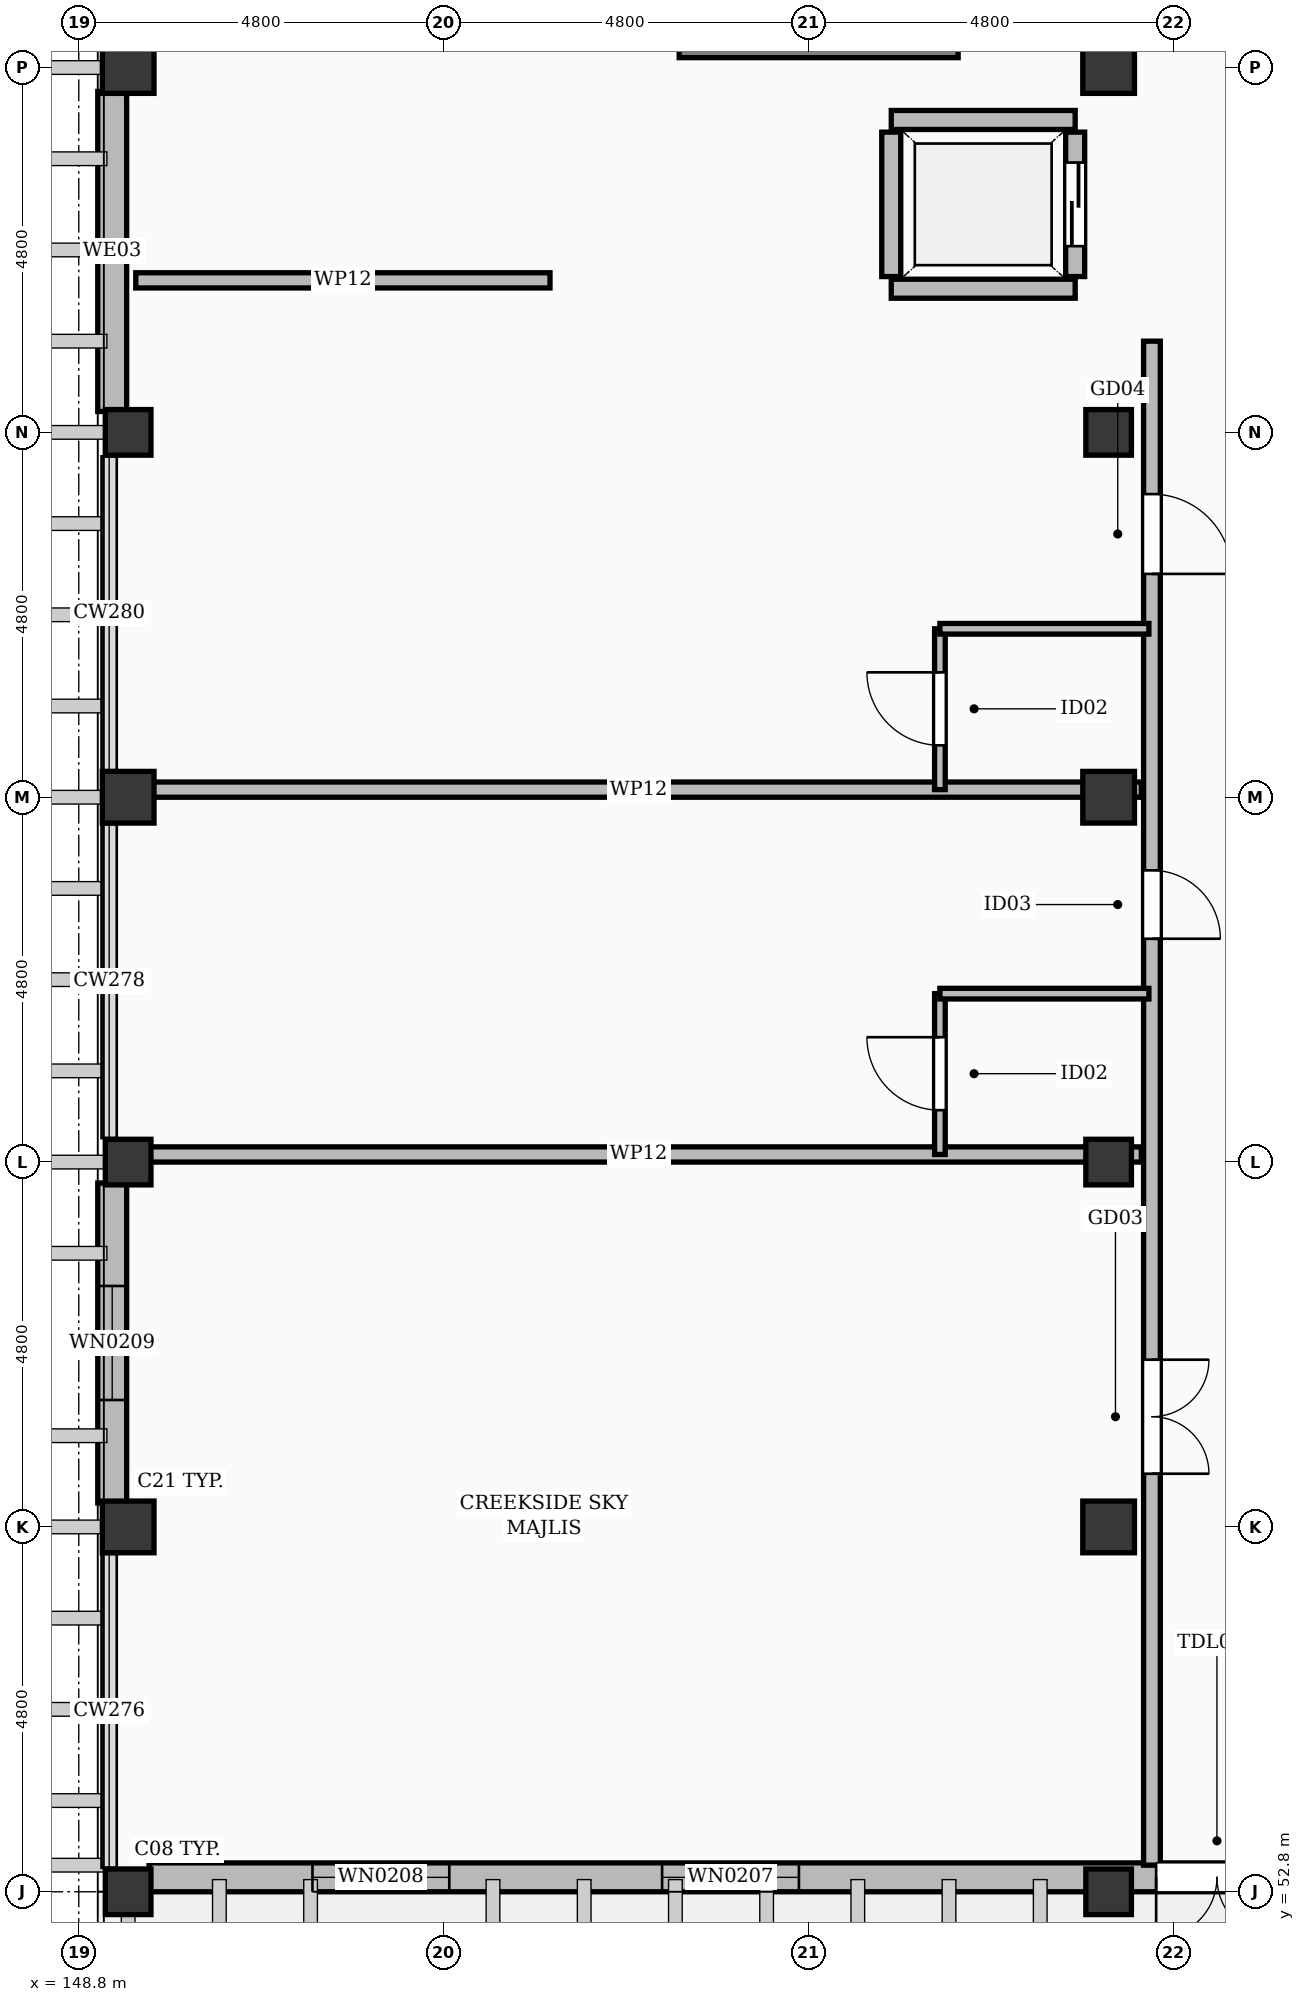
"""IFC4 building model, lengths in metres.
Left out: names, types, materials, properties, quantities, classifications, styles, units other than length and angle.
Written with IfcOpenShell. Run it as: python <this file> out.ifc"""

import sys

from ifc_helpers import new_model, si_unit, direction, frame, frame_2d, origin, origin_2d, place, context, subcontext, project, spatial, rectangle, extrude, element, fill, save


model = new_model("IFC4")
c1 = context("Model", 3, precision=1e-05, world=origin(), true_north=direction((0.0, 1.0)))
c2 = subcontext(c1, "Body", "Model", "MODEL_VIEW")
j1 = project(units=[si_unit("LENGTHUNIT", "METRE"), si_unit("PLANEANGLEUNIT", "RADIAN")], contexts=[c1])
p1 = place(None, origin())
s1 = spatial("IfcSite", under=j1, at=p1, CompositionType="ELEMENT")
p2 = place(p1, origin())
s2 = spatial("IfcBuilding", under=s1, at=p2, CompositionType="ELEMENT")
p3 = place(p2, frame((0.0, 0.0, 35.4)))
s3 = spatial("IfcBuildingStorey", under=s2, at=p3, CompositionType="ELEMENT", Elevation=35.4)
for number, where, z_axis, x_axis in (
    (1, (149.45, 57.6, 0.0), (0.0, 0.0, 1.0), (1.0, 0.0, 0.0)),
    (2, (149.45, 67.2, 0.0), (0.0, 0.0, 1.0), (1.0, 0.0, 0.0)),
    (3, (149.45, 76.8, 0.0), (0.0, 0.0, 1.0), (1.0, 0.0, 0.0)),
    (4, (162.35, 57.6, 0.0), (0.0, 0.0, 1.0), (1.0, 0.0, 0.0)),
    (5, (162.35, 67.2, 0.0), (0.0, 0.0, 1.0), (1.0, 0.0, 0.0)),
    (6, (162.35, 76.8, 0.0), (0.0, 0.0, 1.0), (1.0, 0.0, 0.0)),
):
    element("IfcColumn", number, at=place(p3, frame(where, z_axis=z_axis, x_axis=x_axis)), inside=s3, PredefinedType="COLUMN", context=c2, shape_type="SweptSolid", body=[
        extrude(rectangle(XDim=0.68, YDim=0.68, at=origin_2d()), origin(), (0.0, 0.0, 1.0), 3.6),
    ])
for number, where, z_axis, x_axis in (
    (7, (149.45, 52.8, 0.0), (0.0, 0.0, 1.0), (1.0, 0.0, 0.0)),
    (8, (149.45, 62.4, 0.0), (0.0, 0.0, 1.0), (1.0, 0.0, 0.0)),
    (9, (149.45, 72.0, 0.0), (0.0, 0.0, 1.0), (1.0, 0.0, 0.0)),
    (10, (162.35, 52.8, 0.0), (0.0, 0.0, 1.0), (1.0, 0.0, 0.0)),
    (11, (162.35, 62.4, 0.0), (0.0, 0.0, 1.0), (1.0, 0.0, 0.0)),
    (12, (162.35, 72.0, 0.0), (0.0, 0.0, 1.0), (1.0, 0.0, 0.0)),
):
    element("IfcColumn", number, at=place(p3, frame(where, z_axis=z_axis, x_axis=x_axis)), inside=s3, PredefinedType="COLUMN", context=c2, shape_type="SweptSolid", body=[
        extrude(rectangle(XDim=0.6, YDim=0.6, at=origin_2d()), origin(), (0.0, 0.0, 1.0), 3.6),
    ])
p4 = place(p3, frame((179.075, 52.99, 0.0), z_axis=(0.0, 0.0, 1.0), x_axis=(-1.0, 0.0, 0.0)))
e13 = element("IfcWall", 13, at=p4, inside=s3, PredefinedType="SOLIDWALL", context=c2, shape_type="SweptSolid", body=[
    extrude(rectangle(XDim=29.35, YDim=0.38, at=frame_2d((14.675, 0.0))), origin(), (0.0, 0.0, 1.0), 2.602),
])
p5 = place(p4, frame((14.5, 0.0, 0.0)))
e14 = element("IfcOpeningElement", 14, at=p5, cuts=e13, PredefinedType="OPENING", context=c2, shape_type="SweptSolid", body=[
    extrude(rectangle(XDim=1.6, YDim=2.25, at=frame_2d((0.8, 1.125))), frame((0.0, 0.202, 0.0), z_axis=(0.0, -1.0, 0.0), x_axis=(1.0, 0.0, 0.0)), (0.0, 0.0, 1.0), 0.404),
])
p6 = place(p4, frame((4.0, 0.0, 0.55)))
e15 = element("IfcOpeningElement", 15, at=p6, cuts=e13, PredefinedType="OPENING", context=c2, shape_type="SweptSolid", body=[
    extrude(rectangle(XDim=1.8, YDim=1.76, at=frame_2d((0.9, 0.88))), frame((0.0, 0.202, 0.0), z_axis=(0.0, -1.0, 0.0), x_axis=(1.0, 0.0, 0.0)), (0.0, 0.0, 1.0), 0.404),
])
p7 = place(p4, frame((9.6, 0.0, 0.55)))
e16 = element("IfcOpeningElement", 16, at=p7, cuts=e13, PredefinedType="OPENING", context=c2, shape_type="SweptSolid", body=[
    extrude(rectangle(XDim=1.8, YDim=1.76, at=frame_2d((0.9, 0.88))), frame((0.0, 0.202, 0.0), z_axis=(0.0, -1.0, 0.0), x_axis=(1.0, 0.0, 0.0)), (0.0, 0.0, 1.0), 0.404),
])
p8 = place(p4, frame((20.8, 0.0, 0.55)))
e17 = element("IfcOpeningElement", 17, at=p8, cuts=e13, PredefinedType="OPENING", context=c2, shape_type="SweptSolid", body=[
    extrude(rectangle(XDim=1.8, YDim=1.76, at=frame_2d((0.9, 0.88))), frame((0.0, 0.202, 0.0), z_axis=(0.0, -1.0, 0.0), x_axis=(1.0, 0.0, 0.0)), (0.0, 0.0, 1.0), 0.404),
])
p9 = place(p4, frame((25.4, 0.0, 0.55)))
e18 = element("IfcOpeningElement", 18, at=p9, cuts=e13, PredefinedType="OPENING", context=c2, shape_type="SweptSolid", body=[
    extrude(rectangle(XDim=1.8, YDim=1.76, at=frame_2d((0.9, 0.88))), frame((0.0, 0.202, 0.0), z_axis=(0.0, -1.0, 0.0), x_axis=(1.0, 0.0, 0.0)), (0.0, 0.0, 1.0), 0.404),
])
p10 = place(p3, frame((149.24, 57.915, 0.0), z_axis=(0.0, 0.0, 1.0), x_axis=(0.0, 1.0, 0.0)))
e19 = element("IfcWall", 19, at=p10, inside=s3, PredefinedType="SOLIDWALL", context=c2, shape_type="SweptSolid", body=[
    extrude(rectangle(XDim=4.21, YDim=0.38, at=frame_2d((2.105, 0.0))), origin(), (0.0, 0.0, 1.0), 2.732),
])
p11 = place(p10, frame((1.355, 0.0, 0.55)))
e20 = element("IfcOpeningElement", 20, at=p11, cuts=e19, PredefinedType="OPENING", context=c2, shape_type="SweptSolid", body=[
    extrude(rectangle(XDim=1.5, YDim=1.74, at=frame_2d((0.75, 0.87))), frame((0.0, 0.202, 0.0), z_axis=(0.0, -1.0, 0.0), x_axis=(1.0, 0.0, 0.0)), (0.0, 0.0, 1.0), 0.404),
])
p12 = place(p3, frame((149.24, 72.275, 0.0), z_axis=(0.0, 0.0, 1.0), x_axis=(0.0, 1.0, 0.0)))
e21 = element("IfcWall", 21, at=p12, inside=s3, PredefinedType="SOLIDWALL", context=c2, shape_type="SweptSolid", body=[
    extrude(rectangle(XDim=4.21, YDim=0.38, at=frame_2d((2.105, 0.0))), origin(), (0.0, 0.0, 1.0), 2.732),
])
p13 = place(p3, frame((156.7, 77.18, 0.0), z_axis=(0.0, 0.0, 1.0), x_axis=(1.0, 0.0, 0.0)))
e22 = element("IfcWall", 22, at=p13, inside=s3, PredefinedType="SHEAR", context=c2, shape_type="SweptSolid", body=[
    extrude(rectangle(XDim=3.67, YDim=0.5, at=frame_2d((1.835, 0.0))), origin(), (0.0, 0.0, 1.0), 3.36),
])
for number, where, z_axis, x_axis in (
    (23, (159.49, 73.89, 0.0), (0.0, 0.0, 1.0), (1.0, 0.0, 0.0)),
    (24, (159.49, 76.11, 0.0), (0.0, 0.0, 1.0), (1.0, 0.0, 0.0)),
):
    element("IfcWall", number, at=place(p3, frame(where, z_axis=z_axis, x_axis=x_axis)), inside=s3, PredefinedType="SOLIDWALL", context=c2, shape_type="SweptSolid", body=[
        extrude(rectangle(XDim=2.42, YDim=0.25, at=frame_2d((1.21, 0.0))), origin(), (0.0, 0.0, 1.0), 3.36),
    ])
p14 = place(p3, frame((159.49, 74.05, 0.0), z_axis=(0.0, 0.0, 1.0), x_axis=(0.0, 1.0, 0.0)))
e25 = element("IfcWall", 25, at=p14, inside=s3, PredefinedType="SOLIDWALL", context=c2, shape_type="SweptSolid", body=[
    extrude(rectangle(XDim=1.9, YDim=0.25, at=frame_2d((0.95, 0.0))), origin(), (0.0, 0.0, 1.0), 3.36),
])
p15 = place(p3, frame((161.91, 74.05, 0.0), z_axis=(0.0, 0.0, 1.0), x_axis=(0.0, 1.0, 0.0)))
e26 = element("IfcWall", 26, at=p15, inside=s3, PredefinedType="SOLIDWALL", context=c2, shape_type="SweptSolid", body=[
    extrude(rectangle(XDim=1.9, YDim=0.25, at=frame_2d((0.95, 0.0))), origin(), (0.0, 0.0, 1.0), 3.36),
])
p16 = place(p15, frame((0.4, 0.0, 0.0)))
e27 = element("IfcOpeningElement", 27, at=p16, cuts=e26, PredefinedType="OPENING", context=c2, shape_type="SweptSolid", body=[
    extrude(rectangle(XDim=1.1, YDim=2.2, at=frame_2d((0.55, 1.1))), frame((0.0, 0.137, 0.0), z_axis=(0.0, -1.0, 0.0), x_axis=(1.0, 0.0, 0.0)), (0.0, 0.0, 1.0), 0.274),
])
p17 = place(p3, frame((162.92, 53.15, 0.0), z_axis=(0.0, 0.0, 1.0), x_axis=(0.0, 1.0, 0.0)))
e28 = element("IfcWall", 28, at=p17, inside=s3, PredefinedType="PARTITIONING", context=c2, shape_type="SweptSolid", body=[
    extrude(rectangle(XDim=20.05, YDim=0.22, at=frame_2d((10.025, 0.0))), origin(), (0.0, 0.0, 1.0), 2.732),
])
p18 = place(p17, frame((5.15, 0.0, 0.0)))
e29 = element("IfcOpeningElement", 29, at=p18, cuts=e28, PredefinedType="OPENING", context=c2, shape_type="SweptSolid", body=[
    extrude(rectangle(XDim=1.5, YDim=2.3, at=frame_2d((0.75, 1.15))), frame((0.0, 0.122, 0.0), z_axis=(0.0, -1.0, 0.0), x_axis=(1.0, 0.0, 0.0)), (0.0, 0.0, 1.0), 0.244),
])
p19 = place(p17, frame((12.188, 0.0, 0.0)))
e30 = element("IfcOpeningElement", 30, at=p19, cuts=e28, PredefinedType="OPENING", context=c2, shape_type="SweptSolid", body=[
    extrude(rectangle(XDim=0.9, YDim=2.08, at=frame_2d((0.45, 1.04))), frame((0.0, 0.122, 0.0), z_axis=(0.0, -1.0, 0.0), x_axis=(1.0, 0.0, 0.0)), (0.0, 0.0, 1.0), 0.244),
])
p20 = place(p17, frame((16.988, 0.0, 0.0)))
e31 = element("IfcOpeningElement", 31, at=p20, cuts=e28, PredefinedType="OPENING", context=c2, shape_type="SweptSolid", body=[
    extrude(rectangle(XDim=1.05, YDim=2.22, at=frame_2d((0.525, 1.11))), frame((0.0, 0.122, 0.0), z_axis=(0.0, -1.0, 0.0), x_axis=(1.0, 0.0, 0.0)), (0.0, 0.0, 1.0), 0.244),
])
p21 = place(p3, frame((149.55, 74.0, 0.0), z_axis=(0.0, 0.0, 1.0), x_axis=(1.0, 0.0, 0.0)))
e32 = element("IfcWall", 32, at=p21, inside=s3, PredefinedType="PARTITIONING", context=c2, shape_type="SweptSolid", body=[
    extrude(rectangle(XDim=5.45, YDim=0.2, at=frame_2d((2.725, 0.0))), origin(), (0.0, 0.0, 1.0), 2.732),
])
p22 = place(p3, frame((149.55, 62.5, 0.0), z_axis=(0.0, 0.0, 1.0), x_axis=(1.0, 0.0, 0.0)))
e33 = element("IfcWall", 33, at=p22, inside=s3, PredefinedType="PARTITIONING", context=c2, shape_type="SweptSolid", body=[
    extrude(rectangle(XDim=13.23, YDim=0.2, at=frame_2d((6.615, 0.0))), origin(), (0.0, 0.0, 1.0), 2.732),
])
p23 = place(p3, frame((160.13, 62.5, 0.0), z_axis=(0.0, 0.0, 1.0), x_axis=(0.0, 1.0, 0.0)))
e34 = element("IfcWall", 34, at=p23, inside=s3, PredefinedType="PARTITIONING", context=c2, shape_type="SweptSolid", body=[
    extrude(rectangle(XDim=2.116, YDim=0.14, at=frame_2d((1.058, 0.0))), origin(), (0.0, 0.0, 1.0), 2.732),
])
p24 = place(p23, frame((0.583, 0.0, 0.0)))
e35 = element("IfcOpeningElement", 35, at=p24, cuts=e34, PredefinedType="OPENING", context=c2, shape_type="SweptSolid", body=[
    extrude(rectangle(XDim=0.96, YDim=2.12, at=frame_2d((0.48, 1.06))), frame((0.0, 0.082, 0.0), z_axis=(0.0, -1.0, 0.0), x_axis=(1.0, 0.0, 0.0)), (0.0, 0.0, 1.0), 0.164),
])
p25 = place(p3, frame((160.13, 64.616, 0.0), z_axis=(0.0, 0.0, 1.0), x_axis=(1.0, 0.0, 0.0)))
e36 = element("IfcWall", 36, at=p25, inside=s3, PredefinedType="PARTITIONING", context=c2, shape_type="SweptSolid", body=[
    extrude(rectangle(XDim=2.75, YDim=0.14, at=frame_2d((1.375, 0.0))), origin(), (0.0, 0.0, 1.0), 2.732),
])
p26 = place(p3, frame((149.55, 67.3, 0.0), z_axis=(0.0, 0.0, 1.0), x_axis=(1.0, 0.0, 0.0)))
e37 = element("IfcWall", 37, at=p26, inside=s3, PredefinedType="PARTITIONING", context=c2, shape_type="SweptSolid", body=[
    extrude(rectangle(XDim=13.23, YDim=0.2, at=frame_2d((6.615, 0.0))), origin(), (0.0, 0.0, 1.0), 2.732),
])
p27 = place(p3, frame((160.13, 67.3, 0.0), z_axis=(0.0, 0.0, 1.0), x_axis=(0.0, 1.0, 0.0)))
e38 = element("IfcWall", 38, at=p27, inside=s3, PredefinedType="PARTITIONING", context=c2, shape_type="SweptSolid", body=[
    extrude(rectangle(XDim=2.116, YDim=0.14, at=frame_2d((1.058, 0.0))), origin(), (0.0, 0.0, 1.0), 2.732),
])
p28 = place(p27, frame((0.583, 0.0, 0.0)))
e39 = element("IfcOpeningElement", 39, at=p28, cuts=e38, PredefinedType="OPENING", context=c2, shape_type="SweptSolid", body=[
    extrude(rectangle(XDim=0.96, YDim=2.12, at=frame_2d((0.48, 1.06))), frame((0.0, 0.082, 0.0), z_axis=(0.0, -1.0, 0.0), x_axis=(1.0, 0.0, 0.0)), (0.0, 0.0, 1.0), 0.164),
])
p29 = place(p3, frame((160.13, 69.416, 0.0), z_axis=(0.0, 0.0, 1.0), x_axis=(1.0, 0.0, 0.0)))
e40 = element("IfcWall", 40, at=p29, inside=s3, PredefinedType="PARTITIONING", context=c2, shape_type="SweptSolid", body=[
    extrude(rectangle(XDim=2.75, YDim=0.14, at=frame_2d((1.375, 0.0))), origin(), (0.0, 0.0, 1.0), 2.732),
])
p30 = place(p5, origin())
e41 = element("IfcDoor", 41, at=p30, inside=s3, OperationType="DOUBLE_DOOR_SINGLE_SWING", PredefinedType="DOOR", context=c2, shape_type="SweptSolid", body=[
    extrude(rectangle(XDim=1.6, YDim=2.25, at=frame_2d((0.8, 1.125))), frame((0.0, 0.025, 0.0), z_axis=(0.0, -1.0, 0.0), x_axis=(1.0, 0.0, 0.0)), (0.0, 0.0, 1.0), 0.05),
])
fill(e14, e41)
p31 = place(p8, origin())
e42 = element("IfcWindow", 42, at=p31, inside=s3, PartitioningType="SINGLE_PANEL", PredefinedType="WINDOW", context=c2, shape_type="SweptSolid", body=[
    extrude(rectangle(XDim=1.8, YDim=1.76, at=frame_2d((0.9, 0.88))), frame((0.0, 0.03, 0.0), z_axis=(0.0, -1.0, 0.0), x_axis=(1.0, 0.0, 0.0)), (0.0, 0.0, 1.0), 0.06),
])
fill(e17, e42)
p32 = place(p9, origin())
e43 = element("IfcWindow", 43, at=p32, inside=s3, PartitioningType="SINGLE_PANEL", PredefinedType="WINDOW", context=c2, shape_type="SweptSolid", body=[
    extrude(rectangle(XDim=1.8, YDim=1.76, at=frame_2d((0.9, 0.88))), frame((0.0, 0.03, 0.0), z_axis=(0.0, -1.0, 0.0), x_axis=(1.0, 0.0, 0.0)), (0.0, 0.0, 1.0), 0.06),
])
fill(e18, e43)
p33 = place(p11, origin())
e44 = element("IfcWindow", 44, at=p33, inside=s3, PartitioningType="SINGLE_PANEL", PredefinedType="WINDOW", context=c2, shape_type="SweptSolid", body=[
    extrude(rectangle(XDim=1.5, YDim=1.74, at=frame_2d((0.75, 0.87))), frame((0.0, 0.03, 0.0), z_axis=(0.0, -1.0, 0.0), x_axis=(1.0, 0.0, 0.0)), (0.0, 0.0, 1.0), 0.06),
])
fill(e20, e44)
p34 = place(p16, origin())
e45 = element("IfcDoor", 45, at=p34, inside=s3, OperationType="SLIDING_TO_LEFT", PredefinedType="DOOR", context=c2, shape_type="SweptSolid", body=[
    extrude(rectangle(XDim=1.1, YDim=2.2, at=frame_2d((0.55, 1.1))), frame((0.0, 0.025, 0.0), z_axis=(0.0, -1.0, 0.0), x_axis=(1.0, 0.0, 0.0)), (0.0, 0.0, 1.0), 0.05),
])
fill(e27, e45)
p35 = place(p18, frame((1.5, 0.0, 0.0), z_axis=(0.0, 0.0, 1.0), x_axis=(-1.0, 0.0, 0.0)))
e46 = element("IfcDoor", 46, at=p35, inside=s3, OperationType="DOUBLE_DOOR_SINGLE_SWING", PredefinedType="DOOR", context=c2, shape_type="SweptSolid", body=[
    extrude(rectangle(XDim=1.5, YDim=2.3, at=frame_2d((0.75, 1.15))), frame((0.0, 0.025, 0.0), z_axis=(0.0, -1.0, 0.0), x_axis=(1.0, 0.0, 0.0)), (0.0, 0.0, 1.0), 0.05),
])
fill(e29, e46)
p36 = place(p19, frame((0.9, 0.0, 0.0), z_axis=(0.0, 0.0, 1.0), x_axis=(-1.0, 0.0, 0.0)))
e47 = element("IfcDoor", 47, at=p36, inside=s3, OperationType="SINGLE_SWING_LEFT", PredefinedType="DOOR", context=c2, shape_type="SweptSolid", body=[
    extrude(rectangle(XDim=0.9, YDim=2.08, at=frame_2d((0.45, 1.04))), frame((0.0, 0.025, 0.0), z_axis=(0.0, -1.0, 0.0), x_axis=(1.0, 0.0, 0.0)), (0.0, 0.0, 1.0), 0.05),
])
fill(e30, e47)
p37 = place(p24, origin())
e48 = element("IfcDoor", 48, at=p37, inside=s3, OperationType="SINGLE_SWING_RIGHT", PredefinedType="DOOR", context=c2, shape_type="SweptSolid", body=[
    extrude(rectangle(XDim=0.96, YDim=2.12, at=frame_2d((0.48, 1.06))), frame((0.0, 0.025, 0.0), z_axis=(0.0, -1.0, 0.0), x_axis=(1.0, 0.0, 0.0)), (0.0, 0.0, 1.0), 0.05),
])
fill(e35, e48)
p38 = place(p20, frame((1.05, 0.0, 0.0), z_axis=(0.0, 0.0, 1.0), x_axis=(-1.0, 0.0, 0.0)))
e49 = element("IfcDoor", 49, at=p38, inside=s3, OperationType="SINGLE_SWING_LEFT", PredefinedType="DOOR", context=c2, shape_type="SweptSolid", body=[
    extrude(rectangle(XDim=1.05, YDim=2.22, at=frame_2d((0.525, 1.11))), frame((0.0, 0.025, 0.0), z_axis=(0.0, -1.0, 0.0), x_axis=(1.0, 0.0, 0.0)), (0.0, 0.0, 1.0), 0.05),
])
fill(e31, e49)
p39 = place(p28, origin())
e50 = element("IfcDoor", 50, at=p39, inside=s3, OperationType="SINGLE_SWING_RIGHT", PredefinedType="DOOR", context=c2, shape_type="SweptSolid", body=[
    extrude(rectangle(XDim=0.96, YDim=2.12, at=frame_2d((0.48, 1.06))), frame((0.0, 0.025, 0.0), z_axis=(0.0, -1.0, 0.0), x_axis=(1.0, 0.0, 0.0)), (0.0, 0.0, 1.0), 0.05),
])
fill(e39, e50)
save(model, sys.argv[1])
